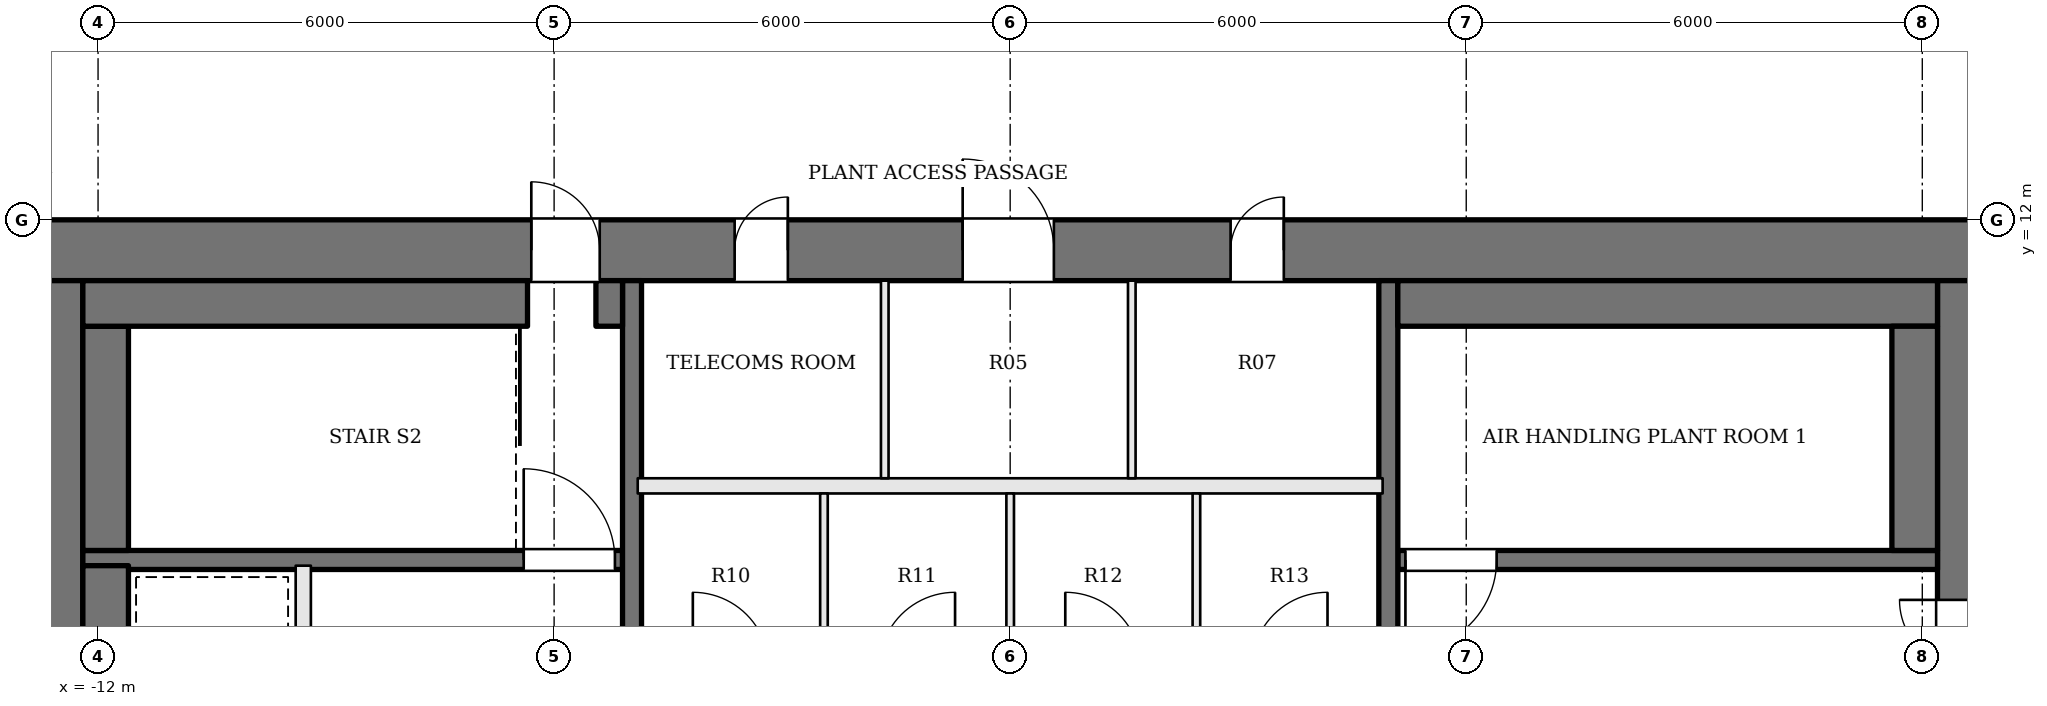
"""IFC4 building model, lengths in metres.
Left out: names, types, materials, properties, quantities, classifications, styles, units other than length and angle.
Written with IfcOpenShell. Run it as: python <this file> out.ifc"""

import sys

from ifc_helpers import new_model, si_unit, direction, frame, frame_2d, origin, place, context, subcontext, project, spatial, rectangle, extrude, element, fill, save


model = new_model("IFC4")
c1 = context("Model", 3, precision=1e-05, world=origin(), true_north=direction((0.0, 1.0)))
c2 = subcontext(c1, "Body", "Model", "MODEL_VIEW")
j1 = project(units=[si_unit("LENGTHUNIT", "METRE"), si_unit("PLANEANGLEUNIT", "RADIAN")], contexts=[c1])
p1 = place(None, origin())
s1 = spatial("IfcSite", under=j1, at=p1, CompositionType="ELEMENT")
p2 = place(p1, origin())
s2 = spatial("IfcBuilding", under=s1, at=p2, CompositionType="ELEMENT")
p3 = place(p2, frame((0.0, 0.0, 316.2)))
s3 = spatial("IfcBuildingStorey", under=s2, at=p3, CompositionType="ELEMENT", Elevation=316.2)
p4 = place(p3, frame((-13.0, 11.6, 0.0), z_axis=(0.0, 0.0, 1.0), x_axis=(1.0, 0.0, 0.0)))
e1 = element("IfcWall", 1, at=p4, inside=s3, PredefinedType="SHEAR", context=c2, shape_type="SweptSolid", body=[
    extrude(rectangle(XDim=26.0, YDim=0.8, at=frame_2d((13.0, 0.0))), origin(), (0.0, 0.0, 1.0), 4.0),
])
p5 = place(p4, frame((9.375, 0.0, 0.0)))
e2 = element("IfcOpeningElement", 2, at=p5, cuts=e1, PredefinedType="OPENING", context=c2, shape_type="SweptSolid", body=[
    extrude(rectangle(XDim=0.7, YDim=2.1, at=frame_2d((0.35, 1.05))), frame((0.0, 0.41, 0.0), z_axis=(0.0, -1.0, 0.0), x_axis=(1.0, 0.0, 0.0)), (0.0, 0.0, 1.0), 0.82),
])
p6 = place(p4, frame((12.375, 0.0, 0.0)))
e3 = element("IfcOpeningElement", 3, at=p6, cuts=e1, PredefinedType="OPENING", context=c2, shape_type="SweptSolid", body=[
    extrude(rectangle(XDim=1.2, YDim=2.1, at=frame_2d((0.6, 1.05))), frame((0.0, 0.41, 0.0), z_axis=(0.0, -1.0, 0.0), x_axis=(1.0, 0.0, 0.0)), (0.0, 0.0, 1.0), 0.82),
])
p7 = place(p4, frame((15.9, 0.0, 0.0)))
e4 = element("IfcOpeningElement", 4, at=p7, cuts=e1, PredefinedType="OPENING", context=c2, shape_type="SweptSolid", body=[
    extrude(rectangle(XDim=0.7, YDim=2.1, at=frame_2d((0.35, 1.05))), frame((0.0, 0.41, 0.0), z_axis=(0.0, -1.0, 0.0), x_axis=(1.0, 0.0, 0.0)), (0.0, 0.0, 1.0), 0.82),
])
p8 = place(p4, frame((6.7, 0.0, 0.0)))
e5 = element("IfcOpeningElement", 5, at=p8, cuts=e1, PredefinedType="OPENING", context=c2, shape_type="SweptSolid", body=[
    extrude(rectangle(XDim=0.9, YDim=2.1, at=frame_2d((0.45, 1.05))), frame((0.0, 0.41, 0.0), z_axis=(0.0, -1.0, 0.0), x_axis=(1.0, 0.0, 0.0)), (0.0, 0.0, 1.0), 0.82),
])
p9 = place(p3, frame((12.6, -2.2, 0.0), z_axis=(0.0, 0.0, 1.0), x_axis=(0.0, 1.0, 0.0)))
e6 = element("IfcWall", 6, at=p9, inside=s3, PredefinedType="SHEAR", context=c2, shape_type="SweptSolid", body=[
    extrude(rectangle(XDim=13.4, YDim=0.8, at=frame_2d((6.7, 0.0))), origin(), (0.0, 0.0, 1.0), 4.0),
])
p10 = place(p9, frame((7.4, 0.0, 0.0)))
e7 = element("IfcOpeningElement", 7, at=p10, cuts=e6, PredefinedType="OPENING", context=c2, shape_type="SweptSolid", body=[
    extrude(rectangle(XDim=1.8, YDim=2.1, at=frame_2d((0.9, 1.05))), frame((0.0, 0.41, 0.0), z_axis=(0.0, -1.0, 0.0), x_axis=(1.0, 0.0, 0.0)), (0.0, 0.0, 1.0), 0.82),
])
p11 = place(p3, frame((-12.6, -2.2, 0.0), z_axis=(0.0, 0.0, 1.0), x_axis=(0.0, 1.0, 0.0)))
e8 = element("IfcWall", 8, at=p11, inside=s3, PredefinedType="SHEAR", context=c2, shape_type="SweptSolid", body=[
    extrude(rectangle(XDim=13.4, YDim=0.8, at=frame_2d((6.7, 0.0))), origin(), (0.0, 0.0, 1.0), 4.0),
])
p12 = place(p11, frame((4.2, 0.0, 0.0)))
e9 = element("IfcOpeningElement", 9, at=p12, cuts=e8, PredefinedType="OPENING", context=c2, shape_type="SweptSolid", body=[
    extrude(rectangle(XDim=1.8, YDim=2.1, at=frame_2d((0.9, 1.05))), frame((0.0, 0.41, 0.0), z_axis=(0.0, -1.0, 0.0), x_axis=(1.0, 0.0, 0.0)), (0.0, 0.0, 1.0), 0.82),
])
p13 = place(p3, frame((12.2, 7.525, 0.0), z_axis=(0.0, 0.0, 1.0), x_axis=(-1.0, 0.0, 0.0)))
e10 = element("IfcWall", 10, at=p13, inside=s3, PredefinedType="SOLIDWALL", context=c2, shape_type="SweptSolid", body=[
    extrude(rectangle(XDim=7.1, YDim=0.25, at=frame_2d((3.55, 0.0))), origin(), (0.0, 0.0, 1.0), 3.28),
])
p14 = place(p13, frame((5.8, 0.0, 0.0)))
e11 = element("IfcOpeningElement", 11, at=p14, cuts=e10, PredefinedType="OPENING", context=c2, shape_type="SweptSolid", body=[
    extrude(rectangle(XDim=1.2, YDim=2.1, at=frame_2d((0.6, 1.05))), frame((0.0, 0.135, 0.0), z_axis=(0.0, -1.0, 0.0), x_axis=(1.0, 0.0, 0.0)), (0.0, 0.0, 1.0), 0.27),
])
p15 = place(p3, frame((-12.2, 7.525, 0.0), z_axis=(0.0, 0.0, 1.0), x_axis=(1.0, 0.0, 0.0)))
e12 = element("IfcWall", 12, at=p15, inside=s3, PredefinedType="SOLIDWALL", context=c2, shape_type="SweptSolid", body=[
    extrude(rectangle(XDim=7.1, YDim=0.25, at=frame_2d((3.55, 0.0))), origin(), (0.0, 0.0, 1.0), 3.28),
])
p16 = place(p15, frame((5.8, 0.0, 0.0)))
e13 = element("IfcOpeningElement", 13, at=p16, cuts=e12, PredefinedType="OPENING", context=c2, shape_type="SweptSolid", body=[
    extrude(rectangle(XDim=1.2, YDim=2.1, at=frame_2d((0.6, 1.05))), frame((0.0, 0.135, 0.0), z_axis=(0.0, -1.0, 0.0), x_axis=(1.0, 0.0, 0.0)), (0.0, 0.0, 1.0), 0.27),
])
p17 = place(p3, frame((-9.3, 4.45, 0.0), z_axis=(0.0, 0.0, 1.0), x_axis=(0.0, 1.0, 0.0)))
e14 = element("IfcWall", 14, at=p17, inside=s3, PredefinedType="SOLIDWALL", context=c2, shape_type="SweptSolid", body=[
    extrude(rectangle(XDim=3.0, YDim=0.2, at=frame_2d((1.5, 0.0))), origin(), (0.0, 0.0, 1.0), 3.28),
])
p18 = place(p3, frame((-4.975, -2.2, 0.0), z_axis=(0.0, 0.0, 1.0), x_axis=(0.0, 1.0, 0.0)))
e15 = element("IfcWall", 15, at=p18, inside=s3, PredefinedType="SOLIDWALL", context=c2, shape_type="SweptSolid", body=[
    extrude(rectangle(XDim=13.4, YDim=0.25, at=frame_2d((6.7, 0.0))), origin(), (0.0, 0.0, 1.0), 3.28),
])
p19 = place(p18, frame((5.25, 0.0, 0.0)))
e16 = element("IfcOpeningElement", 16, at=p19, cuts=e15, PredefinedType="OPENING", context=c2, shape_type="SweptSolid", body=[
    extrude(rectangle(XDim=1.2, YDim=2.1, at=frame_2d((0.6, 1.05))), frame((0.0, 0.135, 0.0), z_axis=(0.0, -1.0, 0.0), x_axis=(1.0, 0.0, 0.0)), (0.0, 0.0, 1.0), 0.27),
])
p20 = place(p3, frame((4.975, 11.2, 0.0), z_axis=(0.0, 0.0, 1.0), x_axis=(0.0, -1.0, 0.0)))
e17 = element("IfcWall", 17, at=p20, inside=s3, PredefinedType="SOLIDWALL", context=c2, shape_type="SweptSolid", body=[
    extrude(rectangle(XDim=13.4, YDim=0.25, at=frame_2d((6.7, 0.0))), origin(), (0.0, 0.0, 1.0), 3.28),
])
p21 = place(p20, frame((5.25, 0.0, 0.0)))
e18 = element("IfcOpeningElement", 18, at=p21, cuts=e17, PredefinedType="OPENING", context=c2, shape_type="SweptSolid", body=[
    extrude(rectangle(XDim=1.2, YDim=2.1, at=frame_2d((0.6, 1.05))), frame((0.0, 0.135, 0.0), z_axis=(0.0, -1.0, 0.0), x_axis=(1.0, 0.0, 0.0)), (0.0, 0.0, 1.0), 0.27),
])
p22 = place(p3, frame((-11.9, 4.45, 0.0), z_axis=(0.0, 0.0, 1.0), x_axis=(0.0, 1.0, 0.0)))
e19 = element("IfcWall", 19, at=p22, inside=s3, PredefinedType="SOLIDWALL", context=c2, shape_type="SweptSolid", body=[
    extrude(rectangle(XDim=3.0, YDim=0.6, at=frame_2d((1.5, 0.0))), origin(), (0.0, 0.0, 1.0), 3.28),
])
p23 = place(p3, frame((-11.9, 7.65, 0.0), z_axis=(0.0, 0.0, 1.0), x_axis=(0.0, 1.0, 0.0)))
e20 = element("IfcWall", 20, at=p23, inside=s3, PredefinedType="SOLIDWALL", context=c2, shape_type="SweptSolid", body=[
    extrude(rectangle(XDim=2.95, YDim=0.6, at=frame_2d((1.475, 0.0))), origin(), (0.0, 0.0, 1.0), 3.28),
])
p24 = place(p3, frame((-12.2, 10.9, 0.0), z_axis=(0.0, 0.0, 1.0), x_axis=(1.0, 0.0, 0.0)))
e21 = element("IfcWall", 21, at=p24, inside=s3, PredefinedType="SOLIDWALL", context=c2, shape_type="SweptSolid", body=[
    extrude(rectangle(XDim=5.85, YDim=0.6, at=frame_2d((2.925, 0.0))), origin(), (0.0, 0.0, 1.0), 3.28),
])
p25 = place(p3, frame((-5.275, 10.6, 0.0), z_axis=(0.0, 0.0, 1.0), x_axis=(0.0, 1.0, 0.0)))
e22 = element("IfcWall", 22, at=p25, inside=s3, PredefinedType="SOLIDWALL", context=c2, shape_type="SweptSolid", body=[
    extrude(rectangle(XDim=0.6, YDim=0.35, at=frame_2d((0.3, 0.0))), origin(), (0.0, 0.0, 1.0), 3.28),
])
p26 = place(p3, frame((12.2, 10.9, 0.0), z_axis=(0.0, 0.0, 1.0), x_axis=(-1.0, 0.0, 0.0)))
e23 = element("IfcWall", 23, at=p26, inside=s3, PredefinedType="SOLIDWALL", context=c2, shape_type="SweptSolid", body=[
    extrude(rectangle(XDim=7.1, YDim=0.6, at=frame_2d((3.55, 0.0))), origin(), (0.0, 0.0, 1.0), 3.28),
])
p27 = place(p3, frame((11.9, 10.6, 0.0), z_axis=(0.0, 0.0, 1.0), x_axis=(0.0, -1.0, 0.0)))
e24 = element("IfcWall", 24, at=p27, inside=s3, PredefinedType="SOLIDWALL", context=c2, shape_type="SweptSolid", body=[
    extrude(rectangle(XDim=2.95, YDim=0.6, at=frame_2d((1.475, 0.0))), origin(), (0.0, 0.0, 1.0), 3.28),
])
p28 = place(p3, frame((-4.9, 8.5, 0.0), z_axis=(0.0, 0.0, 1.0), x_axis=(1.0, 0.0, 0.0)))
e25 = element("IfcWall", 25, at=p28, inside=s3, PredefinedType="SOLIDWALL", context=c2, shape_type="SweptSolid", body=[
    extrude(rectangle(XDim=9.8, YDim=0.2, at=frame_2d((4.9, 0.0))), origin(), (0.0, 0.0, 1.0), 3.28),
])
for number, where, z_axis, x_axis in (
    (26, (-2.45, 6.2, 0.0), (0.0, 0.0, 1.0), (0.0, 1.0, 0.0)),
    (27, (0.0, 6.2, 0.0), (0.0, 0.0, 1.0), (0.0, 1.0, 0.0)),
    (28, (2.45, 6.2, 0.0), (0.0, 0.0, 1.0), (0.0, 1.0, 0.0)),
):
    element("IfcWall", number, at=place(p3, frame(where, z_axis=z_axis, x_axis=x_axis)), inside=s3, PredefinedType="PARTITIONING", context=c2, shape_type="SweptSolid", body=[
        extrude(rectangle(XDim=2.2, YDim=0.1, at=frame_2d((1.1, 0.0))), origin(), (0.0, 0.0, 1.0), 3.28),
    ])
for number, where, z_axis, x_axis in (
    (29, (-1.65, 8.6, 0.0), (0.0, 0.0, 1.0), (0.0, 1.0, 0.0)),
    (30, (1.6, 8.6, 0.0), (0.0, 0.0, 1.0), (0.0, 1.0, 0.0)),
):
    element("IfcWall", number, at=place(p3, frame(where, z_axis=z_axis, x_axis=x_axis)), inside=s3, PredefinedType="PARTITIONING", context=c2, shape_type="SweptSolid", body=[
        extrude(rectangle(XDim=2.6, YDim=0.1, at=frame_2d((1.3, 0.0))), origin(), (0.0, 0.0, 1.0), 3.28),
    ])
p29 = place(p10, origin())
e31 = element("IfcDoor", 31, at=p29, inside=s3, OperationType="DOUBLE_DOOR_SINGLE_SWING", PredefinedType="DOOR", context=c2, shape_type="SweptSolid", body=[
    extrude(rectangle(XDim=1.8, YDim=2.1, at=frame_2d((0.9, 1.05))), frame((0.0, 0.025, 0.0), z_axis=(0.0, -1.0, 0.0), x_axis=(1.0, 0.0, 0.0)), (0.0, 0.0, 1.0), 0.05),
])
fill(e7, e31)
p30 = place(p14, origin())
e32 = element("IfcDoor", 32, at=p30, inside=s3, OperationType="SINGLE_SWING_RIGHT", PredefinedType="DOOR", context=c2, shape_type="SweptSolid", body=[
    extrude(rectangle(XDim=1.2, YDim=2.1, at=frame_2d((0.6, 1.05))), frame((0.0, 0.025, 0.0), z_axis=(0.0, -1.0, 0.0), x_axis=(1.0, 0.0, 0.0)), (0.0, 0.0, 1.0), 0.05),
])
fill(e11, e32)
p31 = place(p16, origin())
e33 = element("IfcDoor", 33, at=p31, inside=s3, OperationType="SINGLE_SWING_LEFT", PredefinedType="DOOR", context=c2, shape_type="SweptSolid", body=[
    extrude(rectangle(XDim=1.2, YDim=2.1, at=frame_2d((0.6, 1.05))), frame((0.0, 0.025, 0.0), z_axis=(0.0, -1.0, 0.0), x_axis=(1.0, 0.0, 0.0)), (0.0, 0.0, 1.0), 0.05),
])
fill(e13, e33)
p32 = place(p5, origin())
e34 = element("IfcDoor", 34, at=p32, inside=s3, OperationType="SINGLE_SWING_RIGHT", PredefinedType="DOOR", context=c2, shape_type="SweptSolid", body=[
    extrude(rectangle(XDim=0.7, YDim=2.1, at=frame_2d((0.35, 1.05))), frame((0.0, 0.025, 0.0), z_axis=(0.0, -1.0, 0.0), x_axis=(1.0, 0.0, 0.0)), (0.0, 0.0, 1.0), 0.05),
])
fill(e2, e34)
p33 = place(p6, origin())
e35 = element("IfcDoor", 35, at=p33, inside=s3, OperationType="SINGLE_SWING_LEFT", PredefinedType="DOOR", context=c2, shape_type="SweptSolid", body=[
    extrude(rectangle(XDim=1.2, YDim=2.1, at=frame_2d((0.6, 1.05))), frame((0.0, 0.025, 0.0), z_axis=(0.0, -1.0, 0.0), x_axis=(1.0, 0.0, 0.0)), (0.0, 0.0, 1.0), 0.05),
])
fill(e3, e35)
p34 = place(p7, origin())
e36 = element("IfcDoor", 36, at=p34, inside=s3, OperationType="SINGLE_SWING_RIGHT", PredefinedType="DOOR", context=c2, shape_type="SweptSolid", body=[
    extrude(rectangle(XDim=0.7, YDim=2.1, at=frame_2d((0.35, 1.05))), frame((0.0, 0.025, 0.0), z_axis=(0.0, -1.0, 0.0), x_axis=(1.0, 0.0, 0.0)), (0.0, 0.0, 1.0), 0.05),
])
fill(e4, e36)
p35 = place(p8, origin())
e37 = element("IfcDoor", 37, at=p35, inside=s3, OperationType="SINGLE_SWING_LEFT", PredefinedType="DOOR", context=c2, shape_type="SweptSolid", body=[
    extrude(rectangle(XDim=0.9, YDim=2.1, at=frame_2d((0.45, 1.05))), frame((0.0, 0.025, 0.0), z_axis=(0.0, -1.0, 0.0), x_axis=(1.0, 0.0, 0.0)), (0.0, 0.0, 1.0), 0.05),
])
fill(e5, e37)
save(model, sys.argv[1])
